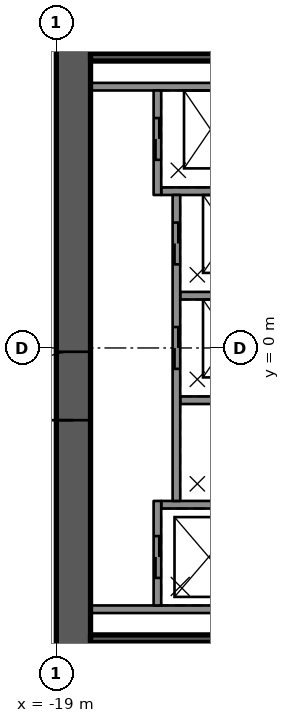
"""IFC4 building model, lengths in metres.
Left out: names, types, materials, properties, quantities, classifications, styles, units other than length and angle.
Written with IfcOpenShell. Run it as: python <this file> out.ifc"""

import sys

from ifc_helpers import new_model, si_unit, direction, frame, frame_2d, origin, place, context, subcontext, project, spatial, rectangle, extrude, element, fill, save


model = new_model("IFC4")
c1 = context("Model", 3, precision=1e-05, world=origin(), true_north=direction((0.0, 1.0)))
c2 = subcontext(c1, "Body", "Model", "MODEL_VIEW")
j1 = project(units=[si_unit("LENGTHUNIT", "METRE"), si_unit("PLANEANGLEUNIT", "RADIAN")], contexts=[c1])
p1 = place(None, origin())
s1 = spatial("IfcSite", under=j1, at=p1, CompositionType="ELEMENT")
p2 = place(p1, origin())
s2 = spatial("IfcBuilding", under=s1, at=p2, CompositionType="ELEMENT")
p3 = place(p2, frame((0.0, 0.0, 145.6)))
s3 = spatial("IfcBuildingStorey", under=s2, at=p3, CompositionType="ELEMENT", Elevation=145.6)
p4 = place(p3, frame((-18.55, -12.0, 0.0), z_axis=(0.0, 0.0, 1.0), x_axis=(0.0, 1.0, 0.0)))
e1 = element("IfcWall", 1, at=p4, inside=s3, PredefinedType="SHEAR", context=c2, shape_type="SweptSolid", body=[
    extrude(rectangle(XDim=24.0, YDim=0.9, at=frame_2d((12.0, 0.0))), origin(), (0.0, 0.0, 1.0), 3.5),
])
p5 = place(p4, frame((10.1, 0.0, 0.0)))
e2 = element("IfcOpeningElement", 2, at=p5, cuts=e1, PredefinedType="OPENING", context=c2, shape_type="SweptSolid", body=[
    extrude(rectangle(XDim=1.8, YDim=2.1, at=frame_2d((0.9, 1.05))), frame((0.0, 0.46, 0.0), z_axis=(0.0, -1.0, 0.0), x_axis=(1.0, 0.0, 0.0)), (0.0, 0.0, 1.0), 0.92),
])
for number, where, z_axis, x_axis in (
    (3, (-11.54, 6.875, 0.0), (0.0, 0.0, 1.0), (-1.0, 0.0, 0.0)),
    (4, (-11.54, -6.875, 0.0), (0.0, 0.0, 1.0), (-1.0, 0.0, 0.0)),
):
    element("IfcWall", number, at=place(p3, frame(where, z_axis=z_axis, x_axis=x_axis)), inside=s3, PredefinedType="SOLIDWALL", context=c2, shape_type="SweptSolid", body=[
        extrude(rectangle(XDim=6.56, YDim=0.2, at=frame_2d((3.28, 0.0))), origin(), (0.0, 0.0, 1.0), 3.09),
    ])
p6 = place(p3, frame((-13.74, -4.125, 0.0), z_axis=(0.0, 0.0, 1.0), x_axis=(-1.0, 0.0, 0.0)))
e5 = element("IfcWall", 5, at=p6, inside=s3, PredefinedType="SOLIDWALL", context=c2, shape_type="SweptSolid", body=[
    extrude(rectangle(XDim=2.5, YDim=0.2, at=frame_2d((1.25, 0.0))), origin(), (0.0, 0.0, 1.0), 3.09),
])
p7 = place(p3, frame((-13.74, -1.375, 0.0), z_axis=(0.0, 0.0, 1.0), x_axis=(-1.0, 0.0, 0.0)))
e6 = element("IfcWall", 6, at=p7, inside=s3, PredefinedType="SOLIDWALL", context=c2, shape_type="SweptSolid", body=[
    extrude(rectangle(XDim=2.0, YDim=0.2, at=frame_2d((1.0, 0.0))), origin(), (0.0, 0.0, 1.0), 3.09),
])
p8 = place(p3, frame((-11.54, 1.375, 0.0), z_axis=(0.0, 0.0, 1.0), x_axis=(-1.0, 0.0, 0.0)))
e7 = element("IfcWall", 7, at=p8, inside=s3, PredefinedType="SOLIDWALL", context=c2, shape_type="SweptSolid", body=[
    extrude(rectangle(XDim=4.2, YDim=0.2, at=frame_2d((2.1, 0.0))), origin(), (0.0, 0.0, 1.0), 3.09),
])
p9 = place(p3, frame((-11.54, 4.125, 0.0), z_axis=(0.0, 0.0, 1.0), x_axis=(-1.0, 0.0, 0.0)))
e8 = element("IfcWall", 8, at=p9, inside=s3, PredefinedType="SOLIDWALL", context=c2, shape_type="SweptSolid", body=[
    extrude(rectangle(XDim=4.7, YDim=0.2, at=frame_2d((2.35, 0.0))), origin(), (0.0, 0.0, 1.0), 3.09),
])
p10 = place(p3, frame((-16.34, -6.775, 0.0), z_axis=(0.0, 0.0, 1.0), x_axis=(0.0, 1.0, 0.0)))
e9 = element("IfcWall", 9, at=p10, inside=s3, PredefinedType="SOLIDWALL", context=c2, shape_type="SweptSolid", body=[
    extrude(rectangle(XDim=2.75, YDim=0.2, at=frame_2d((1.375, 0.0))), origin(), (0.0, 0.0, 1.0), 3.09),
])
p11 = place(p10, frame((0.725, 0.0, 0.0)))
e10 = element("IfcOpeningElement", 10, at=p11, cuts=e9, PredefinedType="OPENING", context=c2, shape_type="SweptSolid", body=[
    extrude(rectangle(XDim=1.1, YDim=2.1, at=frame_2d((0.55, 1.05))), frame((0.0, 0.11, 0.0), z_axis=(0.0, -1.0, 0.0), x_axis=(1.0, 0.0, 0.0)), (0.0, 0.0, 1.0), 0.22),
])
p12 = place(p3, frame((-15.84, -4.025, 0.0), z_axis=(0.0, 0.0, 1.0), x_axis=(0.0, 1.0, 0.0)))
e11 = element("IfcWall", 11, at=p12, inside=s3, PredefinedType="SOLIDWALL", context=c2, shape_type="SweptSolid", body=[
    extrude(rectangle(XDim=8.05, YDim=0.2, at=frame_2d((4.025, 0.0))), origin(), (0.0, 0.0, 1.0), 3.09),
])
p13 = place(p12, frame((3.475, 0.0, 0.0)))
e12 = element("IfcOpeningElement", 12, at=p13, cuts=e11, PredefinedType="OPENING", context=c2, shape_type="SweptSolid", body=[
    extrude(rectangle(XDim=1.1, YDim=2.1, at=frame_2d((0.55, 1.05))), frame((0.0, 0.11, 0.0), z_axis=(0.0, -1.0, 0.0), x_axis=(1.0, 0.0, 0.0)), (0.0, 0.0, 1.0), 0.22),
])
p14 = place(p12, frame((6.225, 0.0, 0.0)))
e13 = element("IfcOpeningElement", 13, at=p14, cuts=e11, PredefinedType="OPENING", context=c2, shape_type="SweptSolid", body=[
    extrude(rectangle(XDim=1.1, YDim=2.1, at=frame_2d((0.55, 1.05))), frame((0.0, 0.11, 0.0), z_axis=(0.0, -1.0, 0.0), x_axis=(1.0, 0.0, 0.0)), (0.0, 0.0, 1.0), 0.22),
])
p15 = place(p3, frame((-16.34, 4.025, 0.0), z_axis=(0.0, 0.0, 1.0), x_axis=(0.0, 1.0, 0.0)))
e14 = element("IfcWall", 14, at=p15, inside=s3, PredefinedType="SOLIDWALL", context=c2, shape_type="SweptSolid", body=[
    extrude(rectangle(XDim=2.75, YDim=0.2, at=frame_2d((1.375, 0.0))), origin(), (0.0, 0.0, 1.0), 3.09),
])
p16 = place(p15, frame((0.925, 0.0, 0.0)))
e15 = element("IfcOpeningElement", 15, at=p16, cuts=e14, PredefinedType="OPENING", context=c2, shape_type="SweptSolid", body=[
    extrude(rectangle(XDim=1.1, YDim=2.1, at=frame_2d((0.55, 1.05))), frame((0.0, 0.11, 0.0), z_axis=(0.0, -1.0, 0.0), x_axis=(1.0, 0.0, 0.0)), (0.0, 0.0, 1.0), 0.22),
])
for number, where, z_axis, x_axis in (
    (16, (-11.54, 7.65, 0.0), (0.0, 0.0, 1.0), (-1.0, 0.0, 0.0)),
    (17, (-11.54, -7.65, 0.0), (0.0, 0.0, 1.0), (-1.0, 0.0, 0.0)),
):
    element("IfcWall", number, at=place(p3, frame(where, z_axis=z_axis, x_axis=x_axis)), inside=s3, PredefinedType="SOLIDWALL", context=c2, shape_type="SweptSolid", body=[
        extrude(rectangle(XDim=6.56, YDim=0.2, at=frame_2d((3.28, 0.0))), origin(), (0.0, 0.0, 1.0), 3.09),
    ])
p17 = place(p11, origin())
e18 = element("IfcDoor", 18, at=p17, inside=s3, OperationType="DOUBLE_DOOR_SLIDING", PredefinedType="DOOR", context=c2, shape_type="SweptSolid", body=[
    extrude(rectangle(XDim=1.1, YDim=2.1, at=frame_2d((0.55, 1.05))), frame((0.0, 0.025, 0.0), z_axis=(0.0, -1.0, 0.0), x_axis=(1.0, 0.0, 0.0)), (0.0, 0.0, 1.0), 0.05),
])
fill(e10, e18)
p18 = place(p13, origin())
e19 = element("IfcDoor", 19, at=p18, inside=s3, OperationType="DOUBLE_DOOR_SLIDING", PredefinedType="DOOR", context=c2, shape_type="SweptSolid", body=[
    extrude(rectangle(XDim=1.1, YDim=2.1, at=frame_2d((0.55, 1.05))), frame((0.0, 0.025, 0.0), z_axis=(0.0, -1.0, 0.0), x_axis=(1.0, 0.0, 0.0)), (0.0, 0.0, 1.0), 0.05),
])
fill(e12, e19)
p19 = place(p14, origin())
e20 = element("IfcDoor", 20, at=p19, inside=s3, OperationType="DOUBLE_DOOR_SLIDING", PredefinedType="DOOR", context=c2, shape_type="SweptSolid", body=[
    extrude(rectangle(XDim=1.1, YDim=2.1, at=frame_2d((0.55, 1.05))), frame((0.0, 0.025, 0.0), z_axis=(0.0, -1.0, 0.0), x_axis=(1.0, 0.0, 0.0)), (0.0, 0.0, 1.0), 0.05),
])
fill(e13, e20)
p20 = place(p16, origin())
e21 = element("IfcDoor", 21, at=p20, inside=s3, OperationType="DOUBLE_DOOR_SLIDING", PredefinedType="DOOR", context=c2, shape_type="SweptSolid", body=[
    extrude(rectangle(XDim=1.1, YDim=2.1, at=frame_2d((0.55, 1.05))), frame((0.0, 0.025, 0.0), z_axis=(0.0, -1.0, 0.0), x_axis=(1.0, 0.0, 0.0)), (0.0, 0.0, 1.0), 0.05),
])
fill(e15, e21)
p21 = place(p5, origin())
e22 = element("IfcDoor", 22, at=p21, inside=s3, OperationType="SINGLE_SWING_LEFT", PredefinedType="DOOR", context=c2, shape_type="SweptSolid", body=[
    extrude(rectangle(XDim=1.8, YDim=2.1, at=frame_2d((0.9, 1.05))), frame((0.0, 0.025, 0.0), z_axis=(0.0, -1.0, 0.0), x_axis=(1.0, 0.0, 0.0)), (0.0, 0.0, 1.0), 0.05),
])
fill(e2, e22)
save(model, sys.argv[1])
